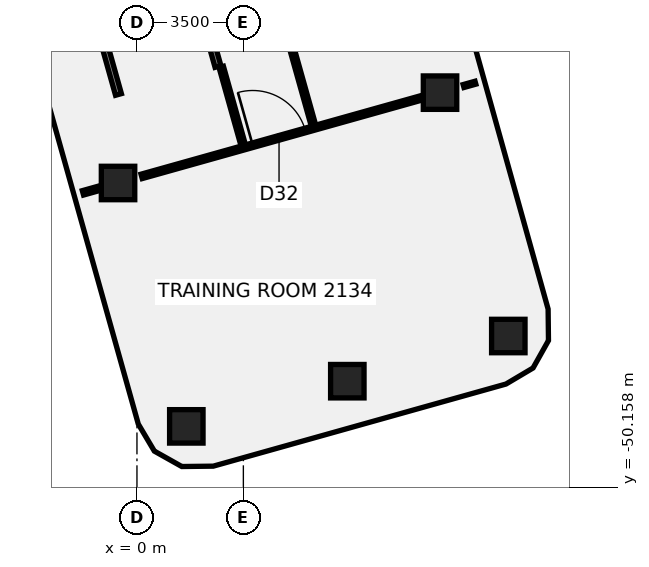
"""IFC4 building model, lengths in metres.
Left out: names, types, materials, properties, quantities, classifications, styles, units other than length and angle.
Written with IfcOpenShell. Run it as: python <this file> out.ifc"""

import sys

from ifc_helpers import new_model, si_unit, direction, frame, frame_2d, origin, origin_2d, place, context, subcontext, project, spatial, polyline, rectangle, outline, extrude, element, fill, save


model = new_model("IFC4")
c1 = context("Model", 3, precision=1e-05, world=origin(), true_north=direction((0.0, 1.0)))
c2 = subcontext(c1, "Body", "Model", "MODEL_VIEW")
j1 = project(units=[si_unit("LENGTHUNIT", "METRE"), si_unit("PLANEANGLEUNIT", "RADIAN")], contexts=[c1])
p1 = place(None, origin())
s1 = spatial("IfcSite", under=j1, at=p1, CompositionType="ELEMENT")
p2 = place(p1, origin())
s2 = spatial("IfcBuilding", under=s1, at=p2, CompositionType="ELEMENT")
p3 = place(p2, frame((0.0, 0.0, 91.0)))
s3 = spatial("IfcBuildingStorey", under=s2, at=p3, CompositionType="ELEMENT", Elevation=91.0)
for number, where, z_axis, x_axis in (
    (1, (9.969, -37.171, -0.138), (0.073, 0.049, 0.996), (-0.96, -0.269, 0.084)),
    (2, (-0.622, -40.143, -0.138), (0.088, -0.002, 0.996), (-0.269, 0.963, 0.026)),
):
    element("IfcColumn", number, at=place(p3, frame(where, z_axis=z_axis, x_axis=x_axis)), inside=s3, PredefinedType="COLUMN", context=c2, shape_type="SweptSolid", body=[
        extrude(rectangle(XDim=1.1, YDim=1.1, at=origin_2d()), origin(), (0.0, 0.0, 1.0), 3.761),
    ])
p4 = place(p3, frame((1.624, -48.147, -0.139), z_axis=(0.126536567828, 0.007238046781, 0.991935536051), x_axis=(-0.268633059123, 0.96285727472, 0.027242394618)))
e3 = element("IfcColumn", 3, at=p4, inside=s3, PredefinedType="COLUMN", context=c2, shape_type="SweptSolid", body=[
    extrude(rectangle(XDim=1.1, YDim=1.1, at=origin_2d()), origin(), (0.0, 0.0, 1.0), 3.778),
])
p5 = place(p3, frame((6.919, -46.661, -0.139), z_axis=(0.119216564291, 0.032713439008, 0.992329200269), x_axis=(-0.270210909527, 0.962800883971, 0.000722631434)))
e4 = element("IfcColumn", 4, at=p5, inside=s3, PredefinedType="COLUMN", context=c2, shape_type="SweptSolid", body=[
    extrude(rectangle(XDim=1.1, YDim=1.1, at=origin_2d()), origin(), (0.0, 0.0, 1.0), 3.776),
])
p6 = place(p3, frame((12.215, -45.176, -0.139), z_axis=(0.111812108325, 0.05816814884, 0.992025462825), x_axis=(-0.955922515822, -0.266445014872, 0.123366112825)))
e5 = element("IfcColumn", 5, at=p6, inside=s3, PredefinedType="COLUMN", context=c2, shape_type="SweptSolid", body=[
    extrude(rectangle(XDim=1.1, YDim=1.1, at=origin_2d()), origin(), (0.0, 0.0, 1.0), 3.777),
])
p7 = place(p3, frame((2.772, -36.324, 0.0), z_axis=(0.0, 0.0, 1.0), x_axis=(0.270166180953, -0.962813707146, 0.0)))
e6 = element("IfcWall", 6, at=p7, inside=s3, PredefinedType="PARTITIONING", context=c2, shape_type="SweptSolid", body=[
    extrude(rectangle(XDim=2.685, YDim=0.15, at=frame_2d((1.342, 0.0))), origin(), (0.0, 0.0, 1.0), 3.01),
])
p8 = place(p3, frame((2.209, -25.431, 0.0), z_axis=(0.0, 0.0, 1.0), x_axis=(0.270149976145, -0.96281825408, 0.0)))
e7 = element("IfcWall", 7, at=p8, inside=s3, PredefinedType="PARTITIONING", context=c2, shape_type="SweptSolid", body=[
    extrude(rectangle(XDim=13.32, YDim=0.15, at=frame_2d((6.66, 0.0))), origin(), (0.0, 0.0, 1.0), 3.01),
])
p9 = place(p8, frame((7.4, 0.0, 0.0)))
e8 = element("IfcOpeningElement", 8, at=p9, cuts=e7, PredefinedType="OPENING", context=c2, shape_type="SweptSolid", body=[
    extrude(rectangle(XDim=1.8, YDim=2.1, at=frame_2d((0.9, 1.05))), frame((0.0, 0.085, 0.0), z_axis=(0.0, -1.0, 0.0), x_axis=(1.0, 0.0, 0.0)), (0.0, 0.0, 1.0), 0.17),
])
p10 = place(p3, frame((-1.777, -40.467, 0.0), z_axis=(0.0, 0.0, 1.0), x_axis=(0.962835433635, 0.270088740484, 0.0)))
e9 = element("IfcWall", 9, at=p10, inside=s3, PredefinedType="PARTITIONING", context=c2, shape_type="SweptSolid", body=[
    extrude(rectangle(XDim=0.71, YDim=0.15, at=frame_2d((0.355, 0.0))), origin(), (0.0, 0.0, 1.0), 3.01),
])
p11 = place(p3, frame((0.154, -39.925, 0.0), z_axis=(0.0, 0.0, 1.0), x_axis=(0.962812046226, 0.270172100044, 0.0)))
e10 = element("IfcWall", 10, at=p11, inside=s3, PredefinedType="PARTITIONING", context=c2, shape_type="SweptSolid", body=[
    extrude(rectangle(XDim=9.703, YDim=0.15, at=frame_2d((4.852, 0.0))), origin(), (0.0, 0.0, 1.0), 3.01),
])
p12 = place(p11, frame((3.794, 0.0, 0.0)))
e11 = element("IfcOpeningElement", 11, at=p12, cuts=e10, PredefinedType="OPENING", context=c2, shape_type="SweptSolid", body=[
    extrude(rectangle(XDim=1.8, YDim=2.1, at=frame_2d((0.9, 1.05))), frame((0.0, 0.085, 0.0), z_axis=(0.0, -1.0, 0.0), x_axis=(1.0, 0.0, 0.0)), (0.0, 0.0, 1.0), 0.17),
])
p13 = place(p3, frame((10.743, -36.954, 0.0), z_axis=(0.0, 0.0, 1.0), x_axis=(0.962807616078, 0.270187887262, 0.0)))
e12 = element("IfcWall", 12, at=p13, inside=s3, PredefinedType="PARTITIONING", context=c2, shape_type="SweptSolid", body=[
    extrude(rectangle(XDim=0.406, YDim=0.1, at=frame_2d((0.203, 0.0))), origin(), (0.0, 0.0, 1.0), 3.01),
])
p14 = place(p3, frame((0.855, -29.861, -0.14), z_axis=(0.0, 0.0, 1.0), x_axis=(0.270155649743, -0.962816662149, 0.0)))
e13 = element("IfcWall", 13, at=p14, inside=s3, PredefinedType="SHEAR", context=c2, shape_type="SweptSolid", body=[
    extrude(rectangle(XDim=6.7, YDim=0.2, at=frame_2d((3.35, 0.0))), origin(), (0.0, 0.0, 1.0), 3.15),
])
p15 = place(p14, frame((0.35, 0.0, 0.0)))
e14 = element("IfcOpeningElement", 14, at=p15, cuts=e13, PredefinedType="OPENING", context=c2, shape_type="SweptSolid", body=[
    extrude(rectangle(XDim=1.0, YDim=2.1, at=frame_2d((0.5, 1.05))), frame((0.0, 0.11, 0.0), z_axis=(0.0, -1.0, 0.0), x_axis=(1.0, 0.0, 0.0)), (0.0, 0.0, 1.0), 0.22),
])
p16 = place(p3, frame((-2.418, -30.78, -0.14), z_axis=(0.0, 0.0, 1.0), x_axis=(0.270112393364, -0.96282879836, 0.0)))
e15 = element("IfcWall", 15, at=p16, inside=s3, PredefinedType="SHEAR", context=c2, shape_type="SweptSolid", body=[
    extrude(rectangle(XDim=6.7, YDim=0.2, at=frame_2d((3.35, 0.0))), origin(), (0.0, 0.0, 1.0), 3.15),
])
p17 = place(p3, frame((0.0, 0.0, -0.14)))
e16 = element("IfcWall", 16, at=p17, inside=s3, PredefinedType="SHEAR", context=c2, shape_type="SweptSolid", body=[
    extrude(outline(polyline([(-0.566, -37.011), (-0.512, -37.204), (2.569, -36.339), (2.515, -36.146), (-0.566, -37.011)])), origin(), (0.0, 0.0, 1.0), 3.15),
])
p18 = place(p12, origin())
e17 = element("IfcDoor", 17, at=p18, inside=s3, OperationType="DOUBLE_DOOR_SINGLE_SWING", PredefinedType="DOOR", context=c2, shape_type="SweptSolid", body=[
    extrude(rectangle(XDim=1.8, YDim=2.1, at=frame_2d((0.9, 1.05))), frame((0.0, 0.025, 0.0), z_axis=(0.0, -1.0, 0.0), x_axis=(1.0, 0.0, 0.0)), (0.0, 0.0, 1.0), 0.05),
])
fill(e11, e17)
save(model, sys.argv[1])
